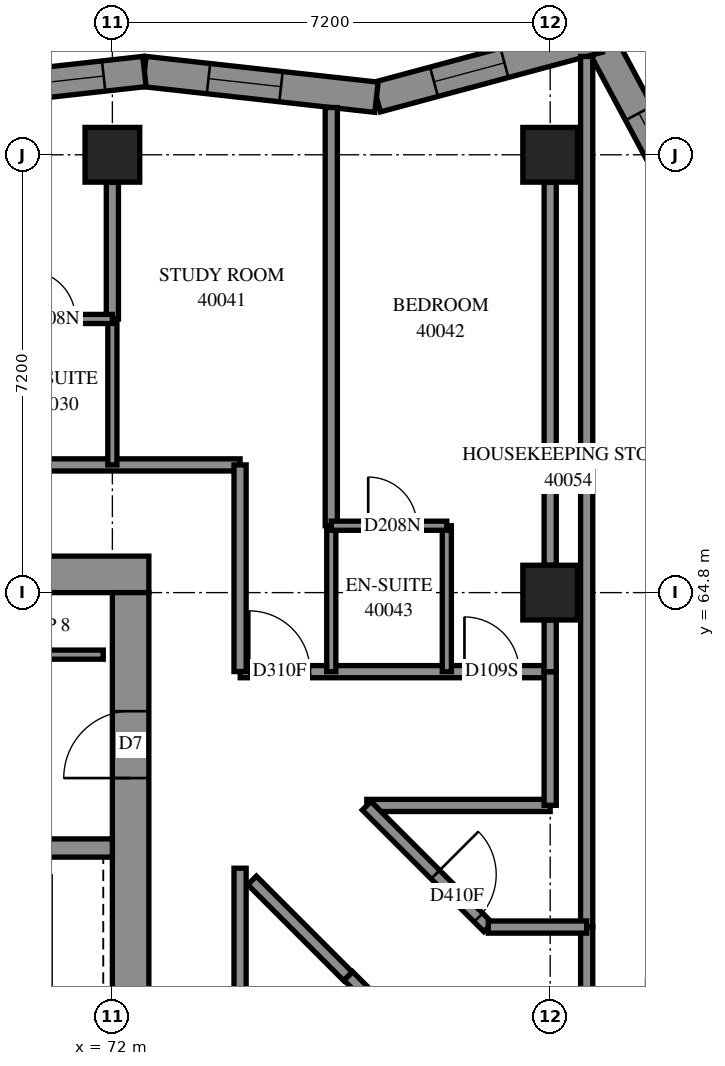
"""IFC4 building model, lengths in metres.
Left out: names, types, materials, properties, quantities, classifications, styles, units other than length and angle.
Written with IfcOpenShell. Run it as: python <this file> out.ifc"""

import sys

from ifc_helpers import new_model, si_unit, direction, frame, frame_2d, origin, origin_2d, place, context, subcontext, project, spatial, polyline, rectangle, outline, extrude, element, fill, save


model = new_model("IFC4")
c1 = context("Model", 3, precision=1e-05, world=origin(), true_north=direction((0.0, 1.0)))
c2 = subcontext(c1, "Body", "Model", "MODEL_VIEW")
j1 = project(units=[si_unit("LENGTHUNIT", "METRE"), si_unit("PLANEANGLEUNIT", "RADIAN")], contexts=[c1])
p1 = place(None, origin())
s1 = spatial("IfcSite", under=j1, at=p1, CompositionType="ELEMENT")
p2 = place(p1, origin())
s2 = spatial("IfcBuilding", under=s1, at=p2, CompositionType="ELEMENT")
p3 = place(p2, frame((0.0, 0.0, 149.0)))
s3 = spatial("IfcBuildingStorey", under=s2, at=p3, CompositionType="ELEMENT", Elevation=149.0)
for number, where, z_axis, x_axis in (
    (1, (72.0, 72.0, 0.0), (0.0, 0.0, 1.0), (1.0, 0.0, 0.0)),
    (2, (79.2, 64.8, 0.0), (0.0, 0.0, 1.0), (1.0, 0.0, 0.0)),
    (3, (79.2, 72.0, 0.0), (0.0, 0.0, 1.0), (1.0, 0.0, 0.0)),
):
    element("IfcColumn", number, at=place(p3, frame(where, z_axis=z_axis, x_axis=x_axis)), inside=s3, PredefinedType="COLUMN", context=c2, shape_type="SweptSolid", body=[
        extrude(rectangle(XDim=0.9, YDim=0.9, at=origin_2d()), origin(), (0.0, 0.0, 1.0), 3.1),
    ])
p4 = place(p3, frame((57.0, 65.1, -0.3), z_axis=(0.0, 0.0, 1.0), x_axis=(1.0, 0.0, 0.0)))
e4 = element("IfcWall", 4, at=p4, inside=s3, PredefinedType="SHEAR", context=c2, shape_type="SweptSolid", body=[
    extrude(rectangle(XDim=15.6, YDim=0.6, at=frame_2d((7.8, 0.0))), origin(), (0.0, 0.0, 1.0), 2.7),
])
p5 = place(p4, frame((10.6, 0.0, 0.3)))
e5 = element("IfcOpeningElement", 5, at=p5, cuts=e4, PredefinedType="OPENING", context=c2, shape_type="SweptSolid", body=[
    extrude(rectangle(XDim=0.8, YDim=2.1, at=frame_2d((0.4, 1.05))), frame((0.0, 0.31, 0.0), z_axis=(0.0, -1.0, 0.0), x_axis=(1.0, 0.0, 0.0)), (0.0, 0.0, 1.0), 0.62),
])
p6 = place(p3, frame((72.3, 50.4, -0.3), z_axis=(0.0, 0.0, 1.0), x_axis=(0.0, 1.0, 0.0)))
e6 = element("IfcWall", 6, at=p6, inside=s3, PredefinedType="SHEAR", context=c2, shape_type="SweptSolid", body=[
    extrude(rectangle(XDim=14.4, YDim=0.6, at=frame_2d((7.2, 0.0))), origin(), (0.0, 0.0, 1.0), 2.7),
])
p7 = place(p6, frame((4.55, 0.0, 0.3)))
e7 = element("IfcOpeningElement", 7, at=p7, cuts=e6, PredefinedType="OPENING", context=c2, shape_type="SweptSolid", body=[
    extrude(rectangle(XDim=1.1, YDim=2.1, at=frame_2d((0.55, 1.05))), frame((0.0, 0.31, 0.0), z_axis=(0.0, -1.0, 0.0), x_axis=(1.0, 0.0, 0.0)), (0.0, 0.0, 1.0), 0.62),
])
p8 = place(p6, frame((11.35, 0.0, 0.3)))
e8 = element("IfcOpeningElement", 8, at=p8, cuts=e6, PredefinedType="OPENING", context=c2, shape_type="SweptSolid", body=[
    extrude(rectangle(XDim=1.1, YDim=2.1, at=frame_2d((0.55, 1.05))), frame((0.0, 0.31, 0.0), z_axis=(0.0, -1.0, 0.0), x_axis=(1.0, 0.0, 0.0)), (0.0, 0.0, 1.0), 0.62),
])
p9 = place(p3, frame((64.8, 60.6, 0.0), z_axis=(0.0, 0.0, 1.0), x_axis=(1.0, 0.0, 0.0)))
e9 = element("IfcWall", 9, at=p9, inside=s3, PredefinedType="SOLIDWALL", context=c2, shape_type="SweptSolid", body=[
    extrude(rectangle(XDim=7.2, YDim=0.3, at=frame_2d((3.6, 0.0))), origin(), (0.0, 0.0, 1.0), 3.1),
])
p10 = place(p3, frame((76.442, 49.302, -0.3), z_axis=(0.0, 0.0, 1.0), x_axis=(0.7071067812, 0.7071067812, 0.0)))
e10 = element("IfcWall", 10, at=p10, inside=s3, PredefinedType="SHEAR", context=c2, shape_type="SweptSolid", body=[
    extrude(rectangle(XDim=14.4, YDim=0.6, at=frame_2d((7.2, 0.0))), origin(), (0.0, 0.0, 1.0), 2.7),
])
p11 = place(p10, frame((4.55, 0.0, 0.3)))
e11 = element("IfcOpeningElement", 11, at=p11, cuts=e10, PredefinedType="OPENING", context=c2, shape_type="SweptSolid", body=[
    extrude(rectangle(XDim=1.1, YDim=2.1, at=frame_2d((0.55, 1.05))), frame((0.0, 0.31, 0.0), z_axis=(0.0, -1.0, 0.0), x_axis=(1.0, 0.0, 0.0)), (0.0, 0.0, 1.0), 0.62),
])
p12 = place(p10, frame((11.35, 0.0, 0.3)))
e12 = element("IfcOpeningElement", 12, at=p12, cuts=e10, PredefinedType="OPENING", context=c2, shape_type="SweptSolid", body=[
    extrude(rectangle(XDim=1.1, YDim=2.1, at=frame_2d((0.55, 1.05))), frame((0.0, 0.31, 0.0), z_axis=(0.0, -1.0, 0.0), x_axis=(1.0, 0.0, 0.0)), (0.0, 0.0, 1.0), 0.62),
])
p13 = place(p3, frame((81.59, 70.947, 0.0), z_axis=(0.0, 0.0, 1.0), x_axis=(-0.472203362, 0.8814896397, 0.0)))
e13 = element("IfcWall", 13, at=p13, inside=s3, PredefinedType="SOLIDWALL", context=c2, shape_type="SweptSolid", body=[
    extrude(outline(polyline([(0.053, -0.25), (3.581, -0.25), (3.184, 0.25), (-0.053, 0.25), (0.053, -0.25)])), origin(), (0.0, 0.0, 1.0), 3.1),
])
p14 = place(p13, frame((0.772, 0.0, 0.45)))
e14 = element("IfcOpeningElement", 14, at=p14, cuts=e13, PredefinedType="OPENING", context=c2, shape_type="SweptSolid", body=[
    extrude(rectangle(XDim=1.2, YDim=2.5, at=frame_2d((0.6, 1.25))), frame((0.0, 0.26, 0.0), z_axis=(0.0, -1.0, 0.0), x_axis=(1.0, 0.0, 0.0)), (0.0, 0.0, 1.0), 0.52),
])
p15 = place(p3, frame((79.993, 73.928, 0.0), z_axis=(0.0, 0.0, 1.0), x_axis=(-0.9656852021, -0.2597154027, 0.0)))
e15 = element("IfcWall", 15, at=p15, inside=s3, PredefinedType="SOLIDWALL", context=c2, shape_type="SweptSolid", body=[
    extrude(outline(polyline([(-0.198, -0.25), (3.733, -0.25), (3.827, 0.25), (0.198, 0.25), (-0.198, -0.25)])), origin(), (0.0, 0.0, 1.0), 3.1),
])
p16 = place(p15, frame((1.601, 0.0, 0.45)))
e16 = element("IfcOpeningElement", 16, at=p16, cuts=e15, PredefinedType="OPENING", context=c2, shape_type="SweptSolid", body=[
    extrude(rectangle(XDim=1.2, YDim=2.5, at=frame_2d((0.6, 1.25))), frame((0.0, 0.26, 0.0), z_axis=(0.0, -1.0, 0.0), x_axis=(1.0, 0.0, 0.0)), (0.0, 0.0, 1.0), 0.52),
])
p17 = place(p3, frame((76.343, 72.946, 0.0), z_axis=(0.0, 0.0, 1.0), x_axis=(-0.9939056334, 0.1102342595, 0.0)))
e17 = element("IfcWall", 17, at=p17, inside=s3, PredefinedType="SOLIDWALL", context=c2, shape_type="SweptSolid", body=[
    extrude(outline(polyline([(0.047, -0.25), (3.867, -0.25), (3.811, 0.25), (-0.047, 0.25), (0.047, -0.25)])), origin(), (0.0, 0.0, 1.0), 3.1),
])
p18 = place(p17, frame((1.579, 0.0, 0.45)))
e18 = element("IfcOpeningElement", 18, at=p18, cuts=e17, PredefinedType="OPENING", context=c2, shape_type="SweptSolid", body=[
    extrude(rectangle(XDim=1.2, YDim=2.5, at=frame_2d((0.6, 1.25))), frame((0.0, 0.26, 0.0), z_axis=(0.0, -1.0, 0.0), x_axis=(1.0, 0.0, 0.0)), (0.0, 0.0, 1.0), 0.52),
])
p19 = place(p3, frame((72.527, 73.37, 0.0), z_axis=(0.0, 0.0, 1.0), x_axis=(-0.99390702, -0.1102217568, 0.0)))
e19 = element("IfcWall", 19, at=p19, inside=s3, PredefinedType="SOLIDWALL", context=c2, shape_type="SweptSolid", body=[
    extrude(outline(polyline([(-0.028, -0.25), (3.792, -0.25), (3.847, 0.25), (0.028, 0.25), (-0.028, -0.25)])), origin(), (0.0, 0.0, 1.0), 3.1),
])
p20 = place(p19, frame((0.675, 0.0, 0.45)))
e20 = element("IfcOpeningElement", 20, at=p20, cuts=e19, PredefinedType="OPENING", context=c2, shape_type="SweptSolid", body=[
    extrude(rectangle(XDim=2.8, YDim=2.5, at=frame_2d((1.4, 1.25))), frame((0.0, 0.26, 0.0), z_axis=(0.0, -1.0, 0.0), x_axis=(1.0, 0.0, 0.0)), (0.0, 0.0, 1.0), 0.52),
])
p21 = place(p3, frame((64.95, 63.78, 0.0), z_axis=(0.0, 0.0, 1.0), x_axis=(1.0, 0.0, 0.0)))
e21 = element("IfcWall", 21, at=p21, inside=s3, PredefinedType="PARTITIONING", context=c2, shape_type="SweptSolid", body=[
    extrude(rectangle(XDim=6.9, YDim=0.15, at=frame_2d((3.45, 0.0))), origin(), (0.0, 0.0, 1.0), 3.1),
])
p22 = place(p3, frame((55.5, 66.9, 0.0), z_axis=(0.0, 0.0, 1.0), x_axis=(1.0, 0.0, 0.0)))
e22 = element("IfcWall", 22, at=p22, inside=s3, PredefinedType="PARTITIONING", context=c2, shape_type="SweptSolid", body=[
    extrude(rectangle(XDim=18.6, YDim=0.2, at=frame_2d((9.3, 0.0))), origin(), (0.0, 0.0, 1.0), 3.1),
])
p23 = place(p22, frame((4.4, 0.0, 0.0)))
e23 = element("IfcOpeningElement", 23, at=p23, cuts=e22, PredefinedType="OPENING", context=c2, shape_type="SweptSolid", body=[
    extrude(rectangle(XDim=0.9, YDim=2.1, at=frame_2d((0.45, 1.05))), frame((0.0, 0.11, 0.0), z_axis=(0.0, -1.0, 0.0), x_axis=(1.0, 0.0, 0.0)), (0.0, 0.0, 1.0), 0.22),
])
p24 = place(p22, frame((6.1, 0.0, 0.0)))
e24 = element("IfcOpeningElement", 24, at=p24, cuts=e22, PredefinedType="OPENING", context=c2, shape_type="SweptSolid", body=[
    extrude(rectangle(XDim=0.9, YDim=2.1, at=frame_2d((0.45, 1.05))), frame((0.0, 0.11, 0.0), z_axis=(0.0, -1.0, 0.0), x_axis=(1.0, 0.0, 0.0)), (0.0, 0.0, 1.0), 0.22),
])
p25 = place(p22, frame((11.65, 0.0, 0.0)))
e25 = element("IfcOpeningElement", 25, at=p25, cuts=e22, PredefinedType="OPENING", context=c2, shape_type="SweptSolid", body=[
    extrude(rectangle(XDim=0.9, YDim=2.1, at=frame_2d((0.45, 1.05))), frame((0.0, 0.11, 0.0), z_axis=(0.0, -1.0, 0.0), x_axis=(1.0, 0.0, 0.0)), (0.0, 0.0, 1.0), 0.22),
])
p26 = place(p22, frame((13.3, 0.0, 0.0)))
e26 = element("IfcOpeningElement", 26, at=p26, cuts=e22, PredefinedType="OPENING", context=c2, shape_type="SweptSolid", body=[
    extrude(rectangle(XDim=0.9, YDim=2.1, at=frame_2d((0.45, 1.05))), frame((0.0, 0.11, 0.0), z_axis=(0.0, -1.0, 0.0), x_axis=(1.0, 0.0, 0.0)), (0.0, 0.0, 1.0), 0.22),
])
p27 = place(p3, frame((79.8, 59.3, 0.0), z_axis=(0.0, 0.0, 1.0), x_axis=(0.0, 1.0, 0.0)))
e27 = element("IfcWall", 27, at=p27, inside=s3, PredefinedType="PARTITIONING", context=c2, shape_type="SweptSolid", body=[
    extrude(rectangle(XDim=14.317, YDim=0.2, at=frame_2d((7.159, 0.0))), origin(), (0.0, 0.0, 1.0), 3.1),
])
p28 = place(p3, frame((75.6, 65.9, 0.0), z_axis=(0.0, 0.0, 1.0), x_axis=(0.0, 1.0, 0.0)))
e28 = element("IfcWall", 28, at=p28, inside=s3, PredefinedType="PARTITIONING", context=c2, shape_type="SweptSolid", body=[
    extrude(rectangle(XDim=6.877, YDim=0.2, at=frame_2d((3.439, 0.0))), origin(), (0.0, 0.0, 1.0), 3.1),
])
p29 = place(p3, frame((74.1, 53.902, 0.0), z_axis=(0.0, 0.0, 1.0), x_axis=(0.0, 1.0, 0.0)))
e29 = element("IfcWall", 29, at=p29, inside=s3, PredefinedType="PARTITIONING", context=c2, shape_type="SweptSolid", body=[
    extrude(rectangle(XDim=6.366, YDim=0.2, at=frame_2d((3.183, 0.0))), origin(), (0.0, 0.0, 1.0), 3.1),
])
p30 = place(p3, frame((79.2, 65.25, 0.0), z_axis=(0.0, 0.0, 1.0), x_axis=(0.0, 1.0, 0.0)))
e30 = element("IfcWall", 30, at=p30, inside=s3, PredefinedType="PARTITIONING", context=c2, shape_type="SweptSolid", body=[
    extrude(rectangle(XDim=6.3, YDim=0.2, at=frame_2d((3.15, 0.0))), origin(), (0.0, 0.0, 1.0), 3.1),
])
p31 = place(p3, frame((74.102, 63.5, 0.0), z_axis=(0.0, 0.0, 1.0), x_axis=(1.0, 0.0, 0.0)))
e31 = element("IfcWall", 31, at=p31, inside=s3, PredefinedType="PARTITIONING", context=c2, shape_type="SweptSolid", body=[
    extrude(rectangle(XDim=5.098, YDim=0.2, at=frame_2d((2.549, 0.0))), origin(), (0.0, 0.0, 1.0), 3.1),
])
p32 = place(p31, frame((0.149, 0.0, 0.0)))
e32 = element("IfcOpeningElement", 32, at=p32, cuts=e31, PredefinedType="OPENING", context=c2, shape_type="SweptSolid", body=[
    extrude(rectangle(XDim=1.0, YDim=2.1, at=frame_2d((0.5, 1.05))), frame((0.0, 0.11, 0.0), z_axis=(0.0, -1.0, 0.0), x_axis=(1.0, 0.0, 0.0)), (0.0, 0.0, 1.0), 0.22),
])
p33 = place(p31, frame((3.688, 0.0, 0.0)))
e33 = element("IfcOpeningElement", 33, at=p33, cuts=e31, PredefinedType="OPENING", context=c2, shape_type="SweptSolid", body=[
    extrude(rectangle(XDim=0.9, YDim=2.1, at=frame_2d((0.45, 1.05))), frame((0.0, 0.11, 0.0), z_axis=(0.0, -1.0, 0.0), x_axis=(1.0, 0.0, 0.0)), (0.0, 0.0, 1.0), 0.22),
])
p34 = place(p3, frame((79.8, 55.49, 0.0), z_axis=(0.0, 0.0, 1.0), x_axis=(0.0, 1.0, 0.0)))
e34 = element("IfcWall", 34, at=p34, inside=s3, PredefinedType="PARTITIONING", context=c2, shape_type="SweptSolid", body=[
    extrude(rectangle(XDim=3.81, YDim=0.2, at=frame_2d((1.905, 0.0))), origin(), (0.0, 0.0, 1.0), 3.1),
])
p35 = place(p3, frame((74.1, 63.502, 0.0), z_axis=(0.0, 0.0, 1.0), x_axis=(0.0, 1.0, 0.0)))
e35 = element("IfcWall", 35, at=p35, inside=s3, PredefinedType="PARTITIONING", context=c2, shape_type="SweptSolid", body=[
    extrude(rectangle(XDim=3.398, YDim=0.2, at=frame_2d((1.699, 0.0))), origin(), (0.0, 0.0, 1.0), 3.1),
])
p36 = place(p3, frame((76.184, 61.3, 0.0), z_axis=(0.0, 0.0, 1.0), x_axis=(1.0, 0.0, 0.0)))
e36 = element("IfcWall", 36, at=p36, inside=s3, PredefinedType="PARTITIONING", context=c2, shape_type="SweptSolid", body=[
    extrude(rectangle(XDim=3.016, YDim=0.2, at=frame_2d((1.508, 0.0))), origin(), (0.0, 0.0, 1.0), 3.1),
])
p37 = place(p3, frame((76.181, 61.295, 0.0), z_axis=(0.0, 0.0, 1.0), x_axis=(0.7071067812, -0.7071067812, 0.0)))
e37 = element("IfcWall", 37, at=p37, inside=s3, PredefinedType="PARTITIONING", context=c2, shape_type="SweptSolid", body=[
    extrude(rectangle(XDim=2.826, YDim=0.2, at=frame_2d((1.413, 0.0))), origin(), (0.0, 0.0, 1.0), 3.1),
])
p38 = place(p37, frame((1.6, 0.0, 0.0)))
e38 = element("IfcOpeningElement", 38, at=p38, cuts=e37, PredefinedType="OPENING", context=c2, shape_type="SweptSolid", body=[
    extrude(rectangle(XDim=1.0, YDim=2.1, at=frame_2d((0.5, 1.05))), frame((0.0, 0.11, 0.0), z_axis=(0.0, -1.0, 0.0), x_axis=(1.0, 0.0, 0.0)), (0.0, 0.0, 1.0), 0.22),
])
for number, where, z_axis, x_axis in (
    (39, (75.6, 63.5, 0.0), (0.0, 0.0, 1.0), (0.0, 1.0, 0.0)),
    (40, (77.5, 63.5, 0.0), (0.0, 0.0, 1.0), (0.0, 1.0, 0.0)),
    (41, (72.0, 66.9, 0.0), (0.0, 0.0, 1.0), (0.0, 1.0, 0.0)),
):
    element("IfcWall", number, at=place(p3, frame(where, z_axis=z_axis, x_axis=x_axis)), inside=s3, PredefinedType="PARTITIONING", context=c2, shape_type="SweptSolid", body=[
        extrude(rectangle(XDim=2.4, YDim=0.15, at=frame_2d((1.2, 0.0))), origin(), (0.0, 0.0, 1.0), 3.1),
    ])
p39 = place(p3, frame((75.879, 58.497, 0.0), z_axis=(0.0, 0.0, 1.0), x_axis=(0.7075423257, -0.7066709682, 0.0)))
e42 = element("IfcWall", 42, at=p39, inside=s3, PredefinedType="PARTITIONING", context=c2, shape_type="SweptSolid", body=[
    extrude(rectangle(XDim=2.295, YDim=0.2, at=frame_2d((1.148, 0.0))), origin(), (0.0, 0.0, 1.0), 3.1),
])
p40 = place(p3, frame((72.0, 69.3, 0.0), z_axis=(0.0, 0.0, 1.0), x_axis=(0.0, 1.0, 0.0)))
e43 = element("IfcWall", 43, at=p40, inside=s3, PredefinedType="PARTITIONING", context=c2, shape_type="SweptSolid", body=[
    extrude(rectangle(XDim=2.25, YDim=0.2, at=frame_2d((1.125, 0.0))), origin(), (0.0, 0.0, 1.0), 3.1),
])
p41 = place(p3, frame((74.297, 60.067, 0.0), z_axis=(0.0, 0.0, 1.0), x_axis=(0.7071067812, -0.7071067812, 0.0)))
e44 = element("IfcWall", 44, at=p41, inside=s3, PredefinedType="PARTITIONING", context=c2, shape_type="SweptSolid", body=[
    extrude(rectangle(XDim=2.229, YDim=0.2, at=frame_2d((1.114, 0.0))), origin(), (0.0, 0.0, 1.0), 3.1),
])
p42 = place(p3, frame((79.2, 61.302, 0.0), z_axis=(0.0, 0.0, 1.0), x_axis=(0.0, 1.0, 0.0)))
e45 = element("IfcWall", 45, at=p42, inside=s3, PredefinedType="PARTITIONING", context=c2, shape_type="SweptSolid", body=[
    extrude(rectangle(XDim=2.198, YDim=0.2, at=frame_2d((1.099, 0.0))), origin(), (0.0, 0.0, 1.0), 3.1),
])
p43 = place(p3, frame((75.6, 65.9, 0.0), z_axis=(0.0, 0.0, 1.0), x_axis=(1.0, 0.0, 0.0)))
e46 = element("IfcWall", 46, at=p43, inside=s3, PredefinedType="PARTITIONING", context=c2, shape_type="SweptSolid", body=[
    extrude(rectangle(XDim=1.9, YDim=0.15, at=frame_2d((0.95, 0.0))), origin(), (0.0, 0.0, 1.0), 3.1),
])
p44 = place(p43, frame((0.607, 0.0, 0.0)))
e47 = element("IfcOpeningElement", 47, at=p44, cuts=e46, PredefinedType="OPENING", context=c2, shape_type="SweptSolid", body=[
    extrude(rectangle(XDim=0.8, YDim=2.1, at=frame_2d((0.4, 1.05))), frame((0.0, 0.085, 0.0), z_axis=(0.0, -1.0, 0.0), x_axis=(1.0, 0.0, 0.0)), (0.0, 0.0, 1.0), 0.17),
])
p45 = place(p3, frame((70.1, 69.3, 0.0), z_axis=(0.0, 0.0, 1.0), x_axis=(1.0, 0.0, 0.0)))
e48 = element("IfcWall", 48, at=p45, inside=s3, PredefinedType="PARTITIONING", context=c2, shape_type="SweptSolid", body=[
    extrude(rectangle(XDim=1.9, YDim=0.15, at=frame_2d((0.95, 0.0))), origin(), (0.0, 0.0, 1.0), 3.1),
])
p46 = place(p45, frame((0.493, 0.0, 0.0)))
e49 = element("IfcOpeningElement", 49, at=p46, cuts=e48, PredefinedType="OPENING", context=c2, shape_type="SweptSolid", body=[
    extrude(rectangle(XDim=0.8, YDim=2.1, at=frame_2d((0.4, 1.05))), frame((0.0, 0.085, 0.0), z_axis=(0.0, -1.0, 0.0), x_axis=(1.0, 0.0, 0.0)), (0.0, 0.0, 1.0), 0.17),
])
p47 = place(p3, frame((78.182, 59.3, 0.0), z_axis=(0.0, 0.0, 1.0), x_axis=(1.0, 0.0, 0.0)))
e50 = element("IfcWall", 50, at=p47, inside=s3, PredefinedType="PARTITIONING", context=c2, shape_type="SweptSolid", body=[
    extrude(rectangle(XDim=1.618, YDim=0.2, at=frame_2d((0.809, 0.0))), origin(), (0.0, 0.0, 1.0), 3.1),
])
p48 = place(p3, frame((79.2, 63.5, 0.0), z_axis=(0.0, 0.0, 1.0), x_axis=(0.0, 1.0, 0.0)))
e51 = element("IfcWall", 51, at=p48, inside=s3, PredefinedType="PARTITIONING", context=c2, shape_type="SweptSolid", body=[
    extrude(rectangle(XDim=0.85, YDim=0.2, at=frame_2d((0.425, 0.0))), origin(), (0.0, 0.0, 1.0), 3.1),
])
p49 = place(p14, origin())
e52 = element("IfcWindow", 52, at=p49, inside=s3, PartitioningType="SINGLE_PANEL", PredefinedType="WINDOW", context=c2, shape_type="SweptSolid", body=[
    extrude(rectangle(XDim=1.2, YDim=2.5, at=frame_2d((0.6, 1.25))), frame((0.0, 0.18, 0.0), z_axis=(0.0, -1.0, 0.0), x_axis=(1.0, 0.0, 0.0)), (0.0, 0.0, 1.0), 0.06),
])
fill(e14, e52)
p50 = place(p16, origin())
e53 = element("IfcWindow", 53, at=p50, inside=s3, PartitioningType="SINGLE_PANEL", PredefinedType="WINDOW", context=c2, shape_type="SweptSolid", body=[
    extrude(rectangle(XDim=1.2, YDim=2.5, at=frame_2d((0.6, 1.25))), frame((0.0, 0.18, 0.0), z_axis=(0.0, -1.0, 0.0), x_axis=(1.0, 0.0, 0.0)), (0.0, 0.0, 1.0), 0.06),
])
fill(e16, e53)
p51 = place(p18, origin())
e54 = element("IfcWindow", 54, at=p51, inside=s3, PartitioningType="SINGLE_PANEL", PredefinedType="WINDOW", context=c2, shape_type="SweptSolid", body=[
    extrude(rectangle(XDim=1.2, YDim=2.5, at=frame_2d((0.6, 1.25))), frame((0.0, 0.18, 0.0), z_axis=(0.0, -1.0, 0.0), x_axis=(1.0, 0.0, 0.0)), (0.0, 0.0, 1.0), 0.06),
])
fill(e18, e54)
p52 = place(p20, origin())
e55 = element("IfcWindow", 55, at=p52, inside=s3, PartitioningType="SINGLE_PANEL", PredefinedType="WINDOW", context=c2, shape_type="SweptSolid", body=[
    extrude(rectangle(XDim=2.8, YDim=2.5, at=frame_2d((1.4, 1.25))), frame((0.0, 0.18, 0.0), z_axis=(0.0, -1.0, 0.0), x_axis=(1.0, 0.0, 0.0)), (0.0, 0.0, 1.0), 0.06),
])
fill(e20, e55)
p53 = place(p8, origin())
e56 = element("IfcDoor", 56, at=p53, inside=s3, OperationType="SINGLE_SWING_RIGHT", PredefinedType="DOOR", context=c2, shape_type="SweptSolid", body=[
    extrude(rectangle(XDim=1.1, YDim=2.1, at=frame_2d((0.55, 1.05))), frame((0.0, 0.025, 0.0), z_axis=(0.0, -1.0, 0.0), x_axis=(1.0, 0.0, 0.0)), (0.0, 0.0, 1.0), 0.05),
])
fill(e8, e56)
p54 = place(p46, origin())
e57 = element("IfcDoor", 57, at=p54, inside=s3, OperationType="SINGLE_SWING_RIGHT", PredefinedType="DOOR", context=c2, shape_type="SweptSolid", body=[
    extrude(rectangle(XDim=0.8, YDim=2.1, at=frame_2d((0.4, 1.05))), frame((0.0, 0.025, 0.0), z_axis=(0.0, -1.0, 0.0), x_axis=(1.0, 0.0, 0.0)), (0.0, 0.0, 1.0), 0.05),
])
fill(e49, e57)
p55 = place(p32, origin())
e58 = element("IfcDoor", 58, at=p55, inside=s3, OperationType="SINGLE_SWING_RIGHT", PredefinedType="DOOR", context=c2, shape_type="SweptSolid", body=[
    extrude(rectangle(XDim=1.0, YDim=2.1, at=frame_2d((0.5, 1.05))), frame((0.0, 0.025, 0.0), z_axis=(0.0, -1.0, 0.0), x_axis=(1.0, 0.0, 0.0)), (0.0, 0.0, 1.0), 0.05),
])
fill(e32, e58)
p56 = place(p33, origin())
e59 = element("IfcDoor", 59, at=p56, inside=s3, OperationType="SINGLE_SWING_LEFT", PredefinedType="DOOR", context=c2, shape_type="SweptSolid", body=[
    extrude(rectangle(XDim=0.9, YDim=2.1, at=frame_2d((0.45, 1.05))), frame((0.0, 0.025, 0.0), z_axis=(0.0, -1.0, 0.0), x_axis=(1.0, 0.0, 0.0)), (0.0, 0.0, 1.0), 0.05),
])
fill(e33, e59)
p57 = place(p44, origin())
e60 = element("IfcDoor", 60, at=p57, inside=s3, OperationType="SINGLE_SWING_RIGHT", PredefinedType="DOOR", context=c2, shape_type="SweptSolid", body=[
    extrude(rectangle(XDim=0.8, YDim=2.1, at=frame_2d((0.4, 1.05))), frame((0.0, 0.025, 0.0), z_axis=(0.0, -1.0, 0.0), x_axis=(1.0, 0.0, 0.0)), (0.0, 0.0, 1.0), 0.05),
])
fill(e47, e60)
p58 = place(p38, origin())
e61 = element("IfcDoor", 61, at=p58, inside=s3, OperationType="SINGLE_SWING_LEFT", PredefinedType="DOOR", context=c2, shape_type="SweptSolid", body=[
    extrude(rectangle(XDim=1.0, YDim=2.1, at=frame_2d((0.5, 1.05))), frame((0.0, 0.025, 0.0), z_axis=(0.0, -1.0, 0.0), x_axis=(1.0, 0.0, 0.0)), (0.0, 0.0, 1.0), 0.05),
])
fill(e38, e61)
save(model, sys.argv[1])
